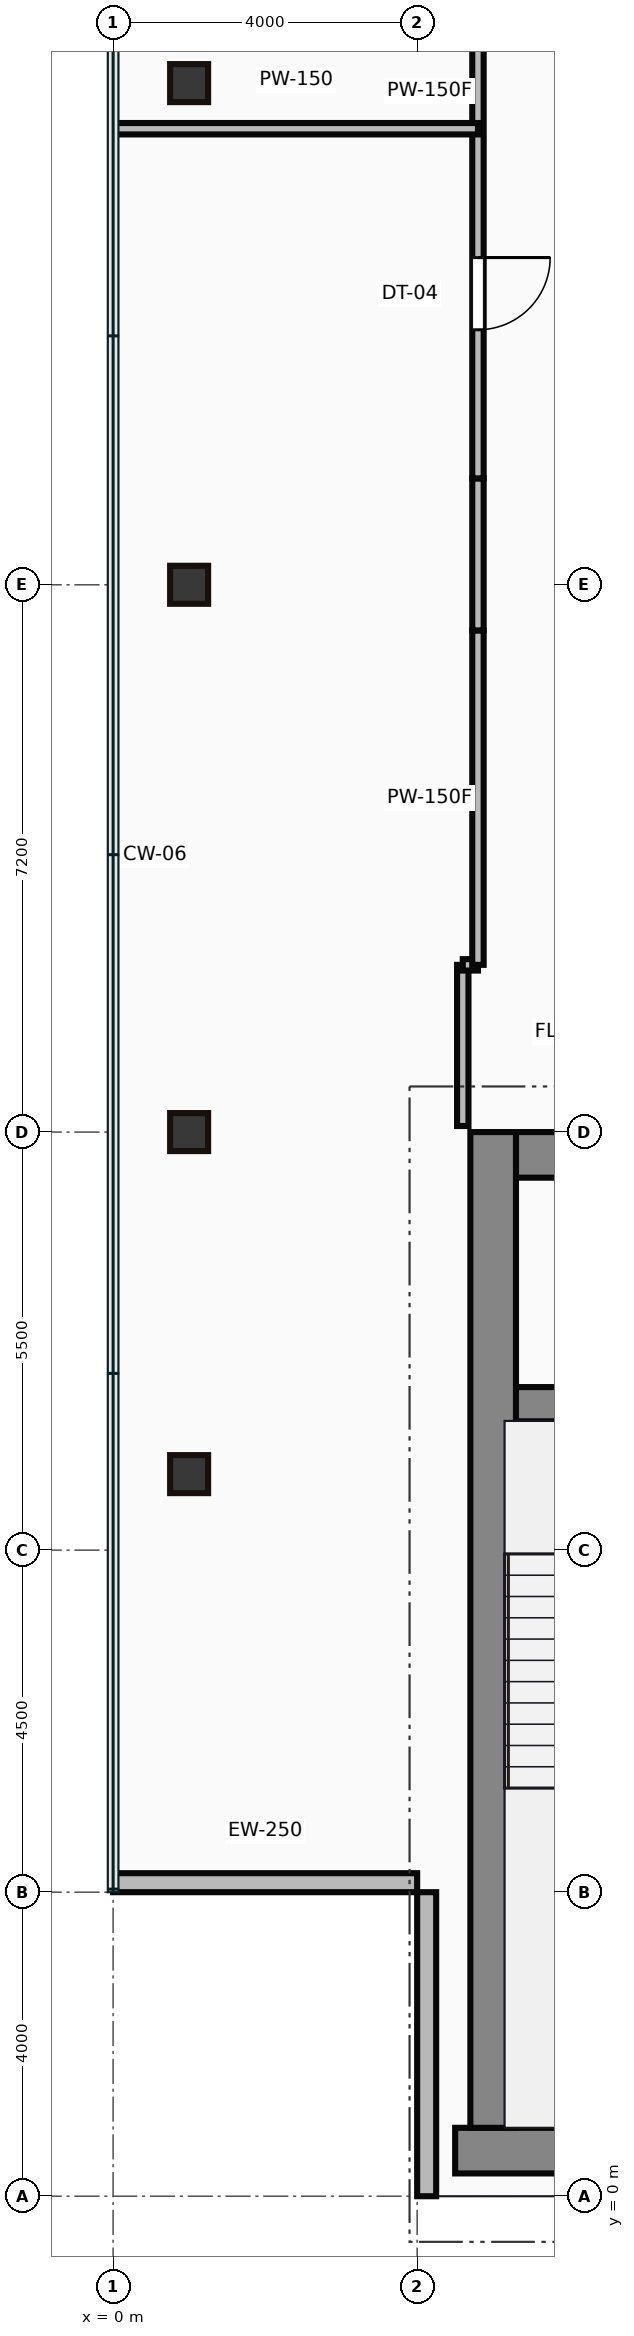
"""IFC4 building model, lengths in metres.
Left out: names, types, materials, properties, quantities, classifications, styles, units other than length and angle.
Written with IfcOpenShell. Run it as: python <this file> out.ifc"""

import sys

from ifc_helpers import new_model, si_unit, direction, frame, frame_2d, origin, origin_2d, place, context, subcontext, project, spatial, rectangle, hollow_rectangle, extrude, source, transform, mapped, element, fill, save


model = new_model("IFC4")
c1 = context("Model", 3, precision=1e-05, world=origin(), true_north=direction((0.0, 1.0)))
c2 = subcontext(c1, "Body", "Model", "MODEL_VIEW")
j1 = project(units=[si_unit("LENGTHUNIT", "METRE"), si_unit("PLANEANGLEUNIT", "RADIAN")], contexts=[c1])
p1 = place(None, origin())
s1 = spatial("IfcSite", under=j1, at=p1, CompositionType="ELEMENT")
p2 = place(p1, origin())
s2 = spatial("IfcBuilding", under=s1, at=p2, CompositionType="ELEMENT")
p3 = place(p2, frame((0.0, 0.0, 288.0)))
s3 = spatial("IfcBuildingStorey", under=s2, at=p3, CompositionType="ELEMENT", Elevation=288.0)
m1 = source(origin(), c2, "Body", "SweptSolid", [
    extrude(rectangle(XDim=29.5, YDim=0.6, at=frame_2d((14.75, 0.0))), origin(), (0.0, 0.0, 1.0), 4.25),
])
p4 = place(p3, frame((4.5, 0.6, 0.0), z_axis=(0.0, 0.0, 1.0), x_axis=(1.0, 0.0, 0.0)))
e1 = element("IfcWall", 1, at=p4, inside=s3, PredefinedType="SHEAR", context=c2, shape_type="MappedRepresentation", body=[
    mapped(m1, transform((0.0, 0.0, 0.0))),
])
m2 = source(origin(), c2, "Body", "SweptSolid", [
    extrude(rectangle(XDim=13.1, YDim=0.6, at=frame_2d((6.55, 0.0))), origin(), (0.0, 0.0, 1.0), 4.25),
])
p5 = place(p3, frame((5.0, 0.9, 0.0), z_axis=(0.0, 0.0, 1.0), x_axis=(0.0, 1.0, 0.0)))
e2 = element("IfcWall", 2, at=p5, inside=s3, PredefinedType="SHEAR", context=c2, shape_type="MappedRepresentation", body=[
    mapped(m2, transform((0.0, 0.0, 0.0))),
])
m3 = source(origin(), c2, "Body", "SweptSolid", [
    extrude(rectangle(XDim=9.1, YDim=0.6, at=frame_2d((4.55, 0.0))), origin(), (0.0, 0.0, 1.0), 4.25),
])
p6 = place(p3, frame((5.3, 13.7, 0.0), z_axis=(0.0, 0.0, 1.0), x_axis=(1.0, 0.0, 0.0)))
e3 = element("IfcWall", 3, at=p6, inside=s3, PredefinedType="SHEAR", context=c2, shape_type="MappedRepresentation", body=[
    mapped(m3, transform((0.0, 0.0, 0.0))),
])
p7 = place(p6, frame((4.1, 0.0, 0.0)))
e4 = element("IfcOpeningElement", 4, at=p7, cuts=e3, PredefinedType="OPENING", context=c2, shape_type="SweptSolid", body=[
    extrude(rectangle(XDim=1.1, YDim=2.15, at=frame_2d((0.55, 1.075))), frame((0.0, 0.31, 0.0), z_axis=(0.0, -1.0, 0.0), x_axis=(1.0, 0.0, 0.0)), (0.0, 0.0, 1.0), 0.62),
])
m4 = source(origin(), c2, "Body", "SweptSolid", [
    extrude(rectangle(XDim=3.39, YDim=0.45, at=frame_2d((1.695, 0.0))), origin(), (0.0, 0.0, 1.0), 4.25),
])
p8 = place(p3, frame((5.25, 10.42, 0.0), z_axis=(0.0, 0.0, 1.0), x_axis=(1.0, 0.0, 0.0)))
e5 = element("IfcWall", 5, at=p8, inside=s3, PredefinedType="SHEAR", context=c2, shape_type="MappedRepresentation", body=[
    mapped(m4, transform((0.0, 0.0, 0.0))),
])
p9 = place(p8, frame((1.05, 0.0, 0.0)))
e6 = element("IfcOpeningElement", 6, at=p9, cuts=e5, PredefinedType="OPENING", context=c2, shape_type="SweptSolid", body=[
    extrude(rectangle(XDim=1.1, YDim=2.15, at=frame_2d((0.55, 1.075))), frame((0.0, 0.235, 0.0), z_axis=(0.0, -1.0, 0.0), x_axis=(1.0, 0.0, 0.0)), (0.0, 0.0, 1.0), 0.47),
])
m5 = source(origin(), c2, "Body", "SweptSolid", [
    extrude(hollow_rectangle(XDim=0.5, YDim=0.5, WallThickness=0.022, at=origin_2d()), origin(), (0.0, 0.0, 1.0), 4.25),
])
for number, where, z_axis, x_axis in (
    (7, (1.0, 9.5, 0.0), (0.0, 0.0, 1.0), (1.0, 0.0, 0.0)),
    (8, (1.0, 14.0, 0.0), (0.0, 0.0, 1.0), (1.0, 0.0, 0.0)),
    (9, (1.0, 21.2, 0.0), (0.0, 0.0, 1.0), (1.0, 0.0, 0.0)),
    (10, (1.0, 27.8, 0.0), (0.0, 0.0, 1.0), (1.0, 0.0, 0.0)),
):
    element("IfcColumn", number, at=place(p3, frame(where, z_axis=z_axis, x_axis=x_axis)), inside=s3, PredefinedType="COLUMN", context=c2, shape_type="MappedRepresentation", body=[
        mapped(m5, transform((0.0, 0.0, 0.0))),
    ])
m6 = source(origin(), c2, "Body", "SweptSolid", [
    extrude(rectangle(XDim=4.0, YDim=0.25, at=frame_2d((2.0, 0.0))), origin(), (0.0, 0.0, 1.0), 3.85),
])
for number, where, z_axis, x_axis in (
    (11, (0.0, 4.125, 0.0), (0.0, 0.0, 1.0), (1.0, 0.0, 0.0)),
    (12, (4.125, 4.0, 0.0), (0.0, 0.0, 1.0), (0.0, -1.0, 0.0)),
):
    element("IfcWall", number, at=place(p3, frame(where, z_axis=z_axis, x_axis=x_axis)), inside=s3, PredefinedType="STANDARD", context=c2, shape_type="MappedRepresentation", body=[
        mapped(m6, transform((0.0, 0.0, 0.0))),
    ])
m7 = source(origin(), c2, "Body", "SweptSolid", [
    extrude(rectangle(XDim=2.12, YDim=0.15, at=frame_2d((1.06, 0.0))), origin(), (0.0, 0.0, 1.0), 3.85),
])
p10 = place(p3, frame((4.6, 14.08, 0.0), z_axis=(0.0, 0.0, 1.0), x_axis=(0.0, 1.0, 0.0)))
e13 = element("IfcWall", 13, at=p10, inside=s3, PredefinedType="PARTITIONING", context=c2, shape_type="MappedRepresentation", body=[
    mapped(m7, transform((0.0, 0.0, 0.0))),
])
m8 = source(origin(), c2, "Body", "SweptSolid", [
    extrude(rectangle(XDim=0.2, YDim=0.15, at=frame_2d((0.1, 0.0))), origin(), (0.0, 0.0, 1.0), 3.85),
])
p11 = place(p3, frame((4.6, 16.2, 0.0), z_axis=(0.0, 0.0, 1.0), x_axis=(1.0, 0.0, 0.0)))
e14 = element("IfcWall", 14, at=p11, inside=s3, PredefinedType="PARTITIONING", context=c2, shape_type="MappedRepresentation", body=[
    mapped(m8, transform((0.0, 0.0, 0.0))),
])
m9 = source(origin(), c2, "Body", "SweptSolid", [
    extrude(rectangle(XDim=4.4, YDim=0.15, at=frame_2d((2.2, 0.0))), origin(), (0.0, 0.0, 1.0), 3.85),
])
p12 = place(p3, frame((4.8, 16.2, 0.0), z_axis=(0.0, 0.0, 1.0), x_axis=(0.0, 1.0, 0.0)))
e15 = element("IfcWall", 15, at=p12, inside=s3, PredefinedType="PARTITIONING", context=c2, shape_type="MappedRepresentation", body=[
    mapped(m9, transform((0.0, 0.0, 0.0))),
])
m10 = source(origin(), c2, "Body", "SweptSolid", [
    extrude(rectangle(XDim=2.0, YDim=0.15, at=frame_2d((1.0, 0.0))), origin(), (0.0, 0.0, 1.0), 3.85),
])
p13 = place(p3, frame((4.8, 20.6, 0.0), z_axis=(0.0, 0.0, 1.0), x_axis=(0.0, 1.0, 0.0)))
e16 = element("IfcWall", 16, at=p13, inside=s3, PredefinedType="PARTITIONING", context=c2, shape_type="MappedRepresentation", body=[
    mapped(m10, transform((0.0, 0.0, 0.0))),
])
m11 = source(origin(), c2, "Body", "SweptSolid", [
    extrude(rectangle(XDim=10.2, YDim=0.15, at=frame_2d((5.1, 0.0))), origin(), (0.0, 0.0, 1.0), 3.85),
])
p14 = place(p3, frame((4.8, 22.6, 0.0), z_axis=(0.0, 0.0, 1.0), x_axis=(0.0, 1.0, 0.0)))
e17 = element("IfcWall", 17, at=p14, inside=s3, PredefinedType="PARTITIONING", context=c2, shape_type="MappedRepresentation", body=[
    mapped(m11, transform((0.0, 0.0, 0.0))),
])
p15 = place(p14, frame((1.955, 0.0, 0.0)))
e18 = element("IfcOpeningElement", 18, at=p15, cuts=e17, PredefinedType="OPENING", context=c2, shape_type="SweptSolid", body=[
    extrude(rectangle(XDim=0.95, YDim=2.15, at=frame_2d((0.475, 1.075))), frame((0.0, 0.085, 0.0), z_axis=(0.0, -1.0, 0.0), x_axis=(1.0, 0.0, 0.0)), (0.0, 0.0, 1.0), 0.17),
])
m12 = source(origin(), c2, "Body", "SweptSolid", [
    extrude(rectangle(XDim=4.78, YDim=0.15, at=frame_2d((2.39, 0.0))), origin(), (0.0, 0.0, 1.0), 3.85),
])
p16 = place(p3, frame((0.02, 27.2, 0.0), z_axis=(0.0, 0.0, 1.0), x_axis=(1.0, 0.0, 0.0)))
e19 = element("IfcWall", 19, at=p16, inside=s3, PredefinedType="PARTITIONING", context=c2, shape_type="MappedRepresentation", body=[
    mapped(m12, transform((0.0, 0.0, 0.0))),
])
m13 = source(origin(), c2, "Body", "SweptSolid", [
    extrude(rectangle(XDim=0.95, YDim=2.15, at=frame_2d((0.475, 1.075))), frame((0.0, 0.025, 0.0), z_axis=(0.0, -1.0, 0.0), x_axis=(1.0, 0.0, 0.0)), (0.0, 0.0, 1.0), 0.05),
])
p17 = place(p15, origin())
e20 = element("IfcDoor", 20, at=p17, inside=s3, OperationType="SINGLE_SWING_RIGHT", PredefinedType="DOOR", context=c2, shape_type="MappedRepresentation", body=[
    mapped(m13, transform((0.0, 0.0, 0.0))),
])
fill(e18, e20)
save(model, sys.argv[1])
